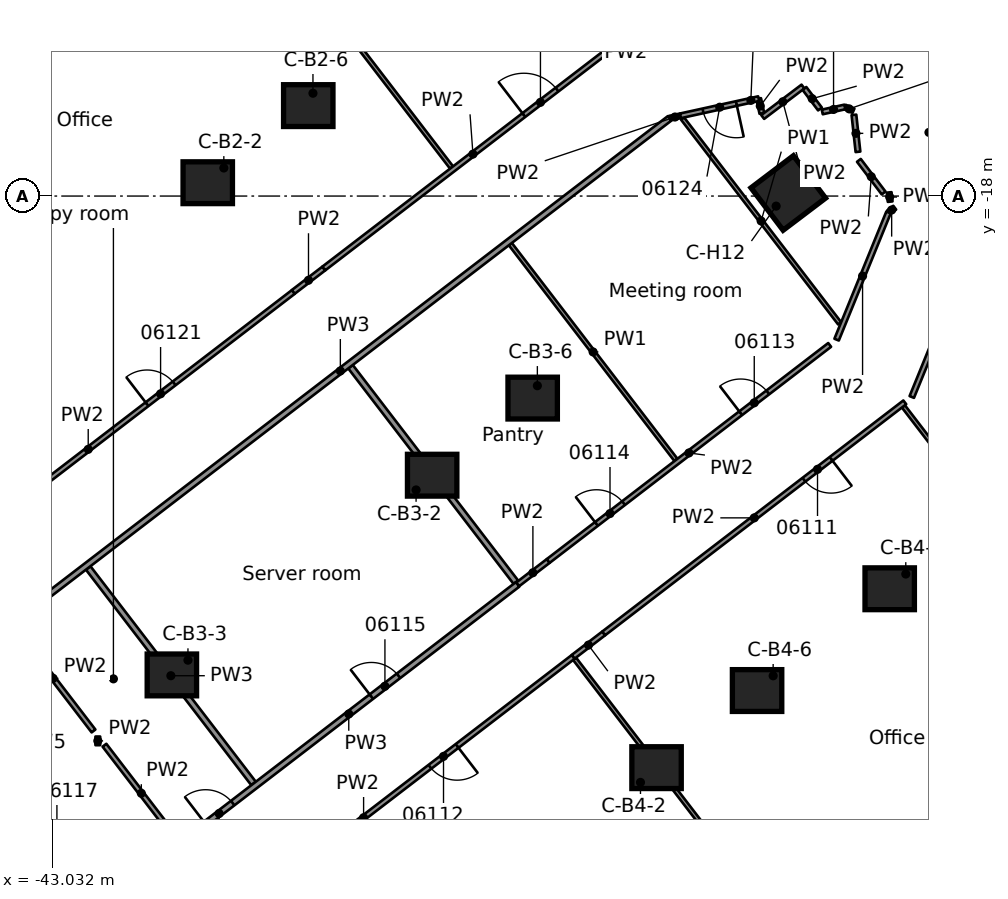
"""IFC4 building model, lengths in metres.
Left out: names, types, materials, properties, quantities, classifications, styles, units other than length and angle.
Written with IfcOpenShell. Run it as: python <this file> out.ifc"""

import sys

from ifc_helpers import new_model, si_unit, direction, frame, frame_2d, origin, origin_2d, place, context, subcontext, project, spatial, rectangle, extrude, element, fill, save


model = new_model("IFC4")
c1 = context("Model", 3, precision=1e-05, world=origin(), true_north=direction((0.0, 1.0)))
c2 = subcontext(c1, "Body", "Model", "MODEL_VIEW")
j1 = project(units=[si_unit("LENGTHUNIT", "METRE"), si_unit("PLANEANGLEUNIT", "RADIAN")], contexts=[c1])
p1 = place(None, origin())
s1 = spatial("IfcSite", under=j1, at=p1, CompositionType="ELEMENT")
p2 = place(p1, origin())
s2 = spatial("IfcBuilding", under=s1, at=p2, CompositionType="ELEMENT")
p3 = place(p2, frame((0.0, 0.0, 29.2)))
s3 = spatial("IfcBuildingStorey", under=s2, at=p3, CompositionType="ELEMENT", Elevation=29.2)
for number, where, z_axis, x_axis in (
    (1, (-38.935, -17.649, 0.0), (0.0, 0.0, 1.0), (1.0, 0.0, 0.0)),
    (2, (-36.29, -15.62, 0.0), (0.0, 0.0, 1.0), (1.0, 0.0, 0.0)),
    (3, (-33.03, -25.345, 0.0), (0.0, 0.0, 1.0), (1.0, 0.0, 0.0)),
    (4, (-39.879, -30.6, 0.0), (0.0, 0.0, 1.0), (1.0, 0.0, 0.0)),
    (5, (-30.385, -23.316, 0.0), (0.0, 0.0, 1.0), (1.0, 0.0, 0.0)),
    (6, (-27.125, -33.04, 0.0), (0.0, 0.0, 1.0), (1.0, 0.0, 0.0)),
    (7, (-24.48, -31.011, 0.0), (0.0, 0.0, 1.0), (1.0, 0.0, 0.0)),
    (8, (-20.99, -28.333, 0.0), (0.0, 0.0, 1.0), (1.0, 0.0, 0.0)),
):
    element("IfcColumn", number, at=place(p3, frame(where, z_axis=z_axis, x_axis=x_axis)), inside=s3, PredefinedType="COLUMN", context=c2, shape_type="SweptSolid", body=[
        extrude(rectangle(XDim=1.3, YDim=1.1, at=origin_2d()), origin(), (0.0, 0.0, 1.0), 4.1),
    ])
p4 = place(p3, frame((-23.659, -17.919, 0.0), z_axis=(0.0, 0.0, 1.0), x_axis=(-0.797162615875, -0.603764659327, 0.0)))
e9 = element("IfcColumn", 9, at=p4, inside=s3, PredefinedType="COLUMN", context=c2, shape_type="SweptSolid", body=[
    extrude(rectangle(XDim=1.4, YDim=1.4, at=origin_2d()), origin(), (0.0, 0.0, 1.0), 4.1),
])
p5 = place(p3, frame((-21.004, -17.904, 0.0), z_axis=(0.0, 0.0, 1.0), x_axis=(0.105933230141, -0.994373245191, 0.0)))
e10 = element("IfcWall", 10, at=p5, inside=s3, PredefinedType="PARTITIONING", context=c2, shape_type="SweptSolid", body=[
    extrude(rectangle(XDim=0.244, YDim=0.125, at=frame_2d((0.122, 0.0))), origin(), (0.0, 0.0, 1.0), 3.66),
])
p6 = place(p3, frame((-21.931, -15.864, 0.0), z_axis=(0.0, 0.0, 1.0), x_axis=(0.10837572028, -0.99411000561, 0.0)))
e11 = element("IfcWall", 11, at=p6, inside=s3, PredefinedType="PARTITIONING", context=c2, shape_type="SweptSolid", body=[
    extrude(rectangle(XDim=0.978, YDim=0.125, at=frame_2d((0.489, 0.0))), origin(), (0.0, 0.0, 1.0), 3.66),
])
p7 = place(p3, frame((-24.438, -15.437, 0.0), z_axis=(0.0, 0.0, 1.0), x_axis=(0.212096867325, -0.977248647413, 0.0)))
e12 = element("IfcWall", 12, at=p7, inside=s3, PredefinedType="PARTITIONING", context=c2, shape_type="SweptSolid", body=[
    extrude(rectangle(XDim=0.396, YDim=0.125, at=frame_2d((0.198, 0.0))), origin(), (0.0, 0.0, 1.0), 3.66),
])
p8 = place(p3, frame((-23.234, -15.168, 0.0), z_axis=(0.0, 0.0, 1.0), x_axis=(0.602990949897, -0.797748026849, 0.0)))
e13 = element("IfcWall", 13, at=p8, inside=s3, PredefinedType="PARTITIONING", context=c2, shape_type="SweptSolid", body=[
    extrude(rectangle(XDim=0.678, YDim=0.125, at=frame_2d((0.339, 0.0))), origin(), (0.0, 0.0, 1.0), 3.66),
])
p9 = place(p3, frame((-21.801, -17.061, 0.0), z_axis=(0.0, 0.0, 1.0), x_axis=(0.604123687543, -0.796890563471, 0.0)))
e14 = element("IfcWall", 14, at=p9, inside=s3, PredefinedType="PARTITIONING", context=c2, shape_type="SweptSolid", body=[
    extrude(rectangle(XDim=1.078, YDim=0.125, at=frame_2d((0.539, 0.0))), origin(), (0.0, 0.0, 1.0), 3.66),
])
p10 = place(p3, frame((-40.384, -38.535, 0.0), z_axis=(0.0, 0.0, 1.0), x_axis=(-0.609026744184, 0.793149686294, 0.0)))
e15 = element("IfcWall", 15, at=p10, inside=s3, PredefinedType="PARTITIONING", context=c2, shape_type="SweptSolid", body=[
    extrude(rectangle(XDim=11.975, YDim=0.125, at=frame_2d((5.987, 0.0))), origin(), (0.0, 0.0, 1.0), 3.049),
])
p11 = place(p10, frame((3.688, 0.0, 0.0)))
e16 = element("IfcOpeningElement", 16, at=p11, cuts=e15, PredefinedType="OPENING", context=c2, shape_type="SweptSolid", body=[
    extrude(rectangle(XDim=0.9, YDim=2.1, at=frame_2d((0.45, 1.05))), frame((0.0, 0.073, 0.0), z_axis=(0.0, -1.0, 0.0), x_axis=(1.0, 0.0, 0.0)), (0.0, 0.0, 1.0), 0.145),
])
p12 = place(p10, frame((7.338, 0.0, 0.0)))
e17 = element("IfcOpeningElement", 17, at=p12, cuts=e15, PredefinedType="OPENING", context=c2, shape_type="SweptSolid", body=[
    extrude(rectangle(XDim=0.9, YDim=2.1, at=frame_2d((0.45, 1.05))), frame((0.0, 0.073, 0.0), z_axis=(0.0, -1.0, 0.0), x_axis=(1.0, 0.0, 0.0)), (0.0, 0.0, 1.0), 0.145),
])
p13 = place(p3, frame((-44.064, -29.307, 0.0), z_axis=(0.0, 0.0, 1.0), x_axis=(0.608587271244, -0.793486945879, 0.0)))
e18 = element("IfcWall", 18, at=p13, inside=s3, PredefinedType="PARTITIONING", context=c2, shape_type="SweptSolid", body=[
    extrude(rectangle(XDim=3.489, YDim=0.125, at=frame_2d((1.744, 0.0))), origin(), (0.0, 0.0, 1.0), 3.66),
])
p14 = place(p3, frame((-41.653, -32.45, 0.0), z_axis=(0.0, 0.0, 1.0), x_axis=(0.60867753108, -0.793417710389, 0.0)))
e19 = element("IfcWall", 19, at=p14, inside=s3, PredefinedType="PARTITIONING", context=c2, shape_type="SweptSolid", body=[
    extrude(rectangle(XDim=3.188, YDim=0.125, at=frame_2d((1.594, 0.0))), origin(), (0.0, 0.0, 1.0), 3.66),
])
p15 = place(p3, frame((-42.081, -27.786, 0.0), z_axis=(0.0, 0.0, 1.0), x_axis=(0.608779288924, -0.793339635577, 0.0)))
e20 = element("IfcWall", 20, at=p15, inside=s3, PredefinedType="PARTITIONING", context=c2, shape_type="SweptSolid", body=[
    extrude(rectangle(XDim=7.147, YDim=0.15, at=frame_2d((3.574, 0.0))), origin(), (0.0, 0.0, 1.0), 3.66),
])
p16 = place(p3, frame((-35.179, -22.489, 0.0), z_axis=(0.0, 0.0, 1.0), x_axis=(0.608729798771, -0.793377610024, 0.0)))
e21 = element("IfcWall", 21, at=p16, inside=s3, PredefinedType="PARTITIONING", context=c2, shape_type="SweptSolid", body=[
    extrude(rectangle(XDim=7.148, YDim=0.15, at=frame_2d((3.574, 0.0))), origin(), (0.0, 0.0, 1.0), 3.66),
])
p17 = place(p3, frame((-29.282, -30.176, 0.0), z_axis=(0.0, 0.0, 1.0), x_axis=(0.608773787241, -0.793343857333, 0.0)))
e22 = element("IfcWall", 22, at=p17, inside=s3, PredefinedType="PARTITIONING", context=c2, shape_type="SweptSolid", body=[
    extrude(rectangle(XDim=14.135, YDim=0.1, at=frame_2d((7.067, 0.0))), origin(), (0.0, 0.0, 1.0), 3.025),
])
p18 = place(p3, frame((-41.126, -6.033, 0.0), z_axis=(0.0, 0.0, 1.0), x_axis=(0.608775561638, -0.793342495743, 0.0)))
e23 = element("IfcWall", 23, at=p18, inside=s3, PredefinedType="PARTITIONING", context=c2, shape_type="SweptSolid", body=[
    extrude(rectangle(XDim=14.136, YDim=0.1, at=frame_2d((7.068, 0.0))), origin(), (0.0, 0.0, 1.0), 3.66),
])
p19 = place(p3, frame((-30.975, -19.261, 0.0), z_axis=(0.0, 0.0, 1.0), x_axis=(0.60876639971, -0.793349526113, 0.0)))
e24 = element("IfcWall", 24, at=p19, inside=s3, PredefinedType="PARTITIONING", context=c2, shape_type="SweptSolid", body=[
    extrude(rectangle(XDim=7.162, YDim=0.1, at=frame_2d((3.581, 0.0))), origin(), (0.0, 0.0, 1.0), 3.66),
])
p20 = place(p3, frame((-26.44, -15.962, 0.0), z_axis=(0.0, 0.0, 1.0), x_axis=(0.608697215762, -0.79340260872, 0.0)))
e25 = element("IfcWall", 25, at=p20, inside=s3, PredefinedType="PARTITIONING", context=c2, shape_type="SweptSolid", body=[
    extrude(rectangle(XDim=6.79, YDim=0.1, at=frame_2d((3.395, 0.0))), origin(), (0.0, 0.0, 1.0), 3.66),
])
p21 = place(p3, frame((-20.629, -23.535, 0.0), z_axis=(0.0, 0.0, 1.0), x_axis=(0.608775561638, -0.793342495743, 0.0)))
e26 = element("IfcWall", 26, at=p21, inside=s3, PredefinedType="PARTITIONING", context=c2, shape_type="SweptSolid", body=[
    extrude(rectangle(XDim=14.136, YDim=0.1, at=frame_2d((7.068, 0.0))), origin(), (0.0, 0.0, 1.0), 3.66),
])
p22 = place(p3, frame((-22.17, -15.656, 0.0), z_axis=(0.0, 0.0, 1.0), x_axis=(0.914864311429, -0.403761429156, 0.0)))
e27 = element("IfcWall", 27, at=p22, inside=s3, PredefinedType="PARTITIONING", context=c2, shape_type="SweptSolid", body=[
    extrude(rectangle(XDim=0.248, YDim=0.125, at=frame_2d((0.124, 0.0))), origin(), (0.0, 0.0, 1.0), 3.66),
])
p23 = place(p3, frame((-26.785, -15.952, 0.0), z_axis=(0.0, 0.0, 1.0), x_axis=(0.977034522057, 0.213081070744, 0.0)))
e28 = element("IfcWall", 28, at=p23, inside=s3, PredefinedType="PARTITIONING", context=c2, shape_type="SweptSolid", body=[
    extrude(rectangle(XDim=0.296, YDim=0.125, at=frame_2d((0.148, 0.0))), origin(), (0.0, 0.0, 1.0), 3.66),
])
p24 = place(p3, frame((-22.765, -15.787, 0.0), z_axis=(0.0, 0.0, 1.0), x_axis=(0.97657209397, 0.215190486033, 0.0)))
e29 = element("IfcWall", 29, at=p24, inside=s3, PredefinedType="PARTITIONING", context=c2, shape_type="SweptSolid", body=[
    extrude(rectangle(XDim=0.609, YDim=0.125, at=frame_2d((0.305, 0.0))), origin(), (0.0, 0.0, 1.0), 3.66),
])
p25 = place(p3, frame((-24.438, -15.437, 0.0), z_axis=(0.0, 0.0, 1.0), x_axis=(-0.976731913461, -0.214463911247, 0.0)))
e30 = element("IfcWall", 30, at=p25, inside=s3, PredefinedType="PARTITIONING", context=c2, shape_type="SweptSolid", body=[
    extrude(rectangle(XDim=2.107, YDim=0.125, at=frame_2d((1.054, 0.0))), origin(), (0.0, 0.0, 1.0), 3.66),
])
p26 = place(p25, frame((0.6, 0.0, 0.0)))
e31 = element("IfcOpeningElement", 31, at=p26, cuts=e30, PredefinedType="OPENING", context=c2, shape_type="SweptSolid", body=[
    extrude(rectangle(XDim=0.9, YDim=2.1, at=frame_2d((0.45, 1.05))), frame((0.0, 0.073, 0.0), z_axis=(0.0, -1.0, 0.0), x_axis=(1.0, 0.0, 0.0)), (0.0, 0.0, 1.0), 0.145),
])
p27 = place(p3, frame((-24.332, -15.92, 0.0), z_axis=(0.0, 0.0, 1.0), x_axis=(0.797480426333, 0.603344818172, 0.0)))
e32 = element("IfcWall", 32, at=p27, inside=s3, PredefinedType="PARTITIONING", context=c2, shape_type="SweptSolid", body=[
    extrude(rectangle(XDim=1.329, YDim=0.125, at=frame_2d((0.665, 0.0))), origin(), (0.0, 0.0, 1.0), 3.66),
])
p28 = place(p3, frame((-21.019, -18.428, 0.0), z_axis=(0.0, 0.0, 1.0), x_axis=(0.797092148154, 0.603857687995, 0.0)))
e33 = element("IfcWall", 33, at=p28, inside=s3, PredefinedType="PARTITIONING", context=c2, shape_type="SweptSolid", body=[
    extrude(rectangle(XDim=0.202, YDim=0.125, at=frame_2d((0.101, 0.0))), origin(), (0.0, 0.0, 1.0), 3.66),
])
p29 = place(p3, frame((-29.32, -30.124, 0.0), z_axis=(0.0, 0.0, 1.0), x_axis=(0.793776779764, 0.608209194198, 0.0)))
e34 = element("IfcWall", 34, at=p29, inside=s3, PredefinedType="PARTITIONING", context=c2, shape_type="SweptSolid", body=[
    extrude(rectangle(XDim=1.014, YDim=0.125, at=frame_2d((0.507, 0.0))), origin(), (0.0, 0.0, 1.0), 3.66),
])
p30 = place(p3, frame((-29.32, -30.127, 0.0), z_axis=(0.0, 0.0, 1.0), x_axis=(-0.793456491448, -0.608626976217, 0.0)))
e35 = element("IfcWall", 35, at=p30, inside=s3, PredefinedType="PARTITIONING", context=c2, shape_type="SweptSolid", body=[
    extrude(rectangle(XDim=13.898, YDim=0.125, at=frame_2d((6.949, 0.0))), origin(), (0.0, 0.0, 1.0), 3.66),
])
p31 = place(p30, frame((3.849, 0.0, 0.0)))
e36 = element("IfcOpeningElement", 36, at=p31, cuts=e35, PredefinedType="OPENING", context=c2, shape_type="SweptSolid", body=[
    extrude(rectangle(XDim=0.9, YDim=2.1, at=frame_2d((0.45, 1.05))), frame((0.0, 0.073, 0.0), z_axis=(0.0, -1.0, 0.0), x_axis=(1.0, 0.0, 0.0)), (0.0, 0.0, 1.0), 0.145),
])
p32 = place(p3, frame((-20.593, -23.428, 0.0), z_axis=(0.0, 0.0, 1.0), x_axis=(-0.793332393454, -0.608788726486, 0.0)))
e37 = element("IfcWall", 37, at=p32, inside=s3, PredefinedType="PARTITIONING", context=c2, shape_type="SweptSolid", body=[
    extrude(rectangle(XDim=9.986, YDim=0.125, at=frame_2d((4.993, 0.0))), origin(), (0.0, 0.0, 1.0), 3.66),
])
p33 = place(p32, frame((2.445, 0.0, 0.0)))
e38 = element("IfcOpeningElement", 38, at=p33, cuts=e37, PredefinedType="OPENING", context=c2, shape_type="SweptSolid", body=[
    extrude(rectangle(XDim=0.9, YDim=2.1, at=frame_2d((0.45, 1.05))), frame((0.0, 0.073, 0.0), z_axis=(0.0, -1.0, 0.0), x_axis=(1.0, 0.0, 0.0)), (0.0, 0.0, 1.0), 0.145),
])
p34 = place(p3, frame((-30.782, -28.22, 0.0), z_axis=(0.0, 0.0, 1.0), x_axis=(0.793579274907, 0.608466872096, 0.0)))
e39 = element("IfcWall", 39, at=p34, inside=s3, PredefinedType="PARTITIONING", context=c2, shape_type="SweptSolid", body=[
    extrude(rectangle(XDim=1.016, YDim=0.125, at=frame_2d((0.508, 0.0))), origin(), (0.0, 0.0, 1.0), 3.66),
])
p35 = place(p3, frame((-39.667, -35.038, 0.0), z_axis=(0.0, 0.0, 1.0), x_axis=(0.793293656215, 0.608839202917, 0.0)))
e40 = element("IfcWall", 40, at=p35, inside=s3, PredefinedType="PARTITIONING", context=c2, shape_type="SweptSolid", body=[
    extrude(rectangle(XDim=11.2, YDim=0.15, at=frame_2d((5.6, 0.0))), origin(), (0.0, 0.0, 1.0), 3.66),
])
p36 = place(p35, frame((6.35, 0.0, 0.0)))
e41 = element("IfcOpeningElement", 41, at=p36, cuts=e40, PredefinedType="OPENING", context=c2, shape_type="SweptSolid", body=[
    extrude(rectangle(XDim=0.9, YDim=2.1, at=frame_2d((0.45, 1.05))), frame((0.0, 0.085, 0.0), z_axis=(0.0, -1.0, 0.0), x_axis=(1.0, 0.0, 0.0)), (0.0, 0.0, 1.0), 0.17),
])
p37 = place(p35, frame((0.85, 0.0, 0.0)))
e42 = element("IfcOpeningElement", 42, at=p37, cuts=e40, PredefinedType="OPENING", context=c2, shape_type="SweptSolid", body=[
    extrude(rectangle(XDim=0.9, YDim=2.1, at=frame_2d((0.45, 1.05))), frame((0.0, 0.085, 0.0), z_axis=(0.0, -1.0, 0.0), x_axis=(1.0, 0.0, 0.0)), (0.0, 0.0, 1.0), 0.17),
])
p38 = place(p3, frame((-29.976, -27.602, 0.0), z_axis=(0.0, 0.0, 1.0), x_axis=(0.793237948633, 0.608911780843, 0.0)))
e43 = element("IfcWall", 43, at=p38, inside=s3, PredefinedType="PARTITIONING", context=c2, shape_type="SweptSolid", body=[
    extrude(rectangle(XDim=9.336, YDim=0.125, at=frame_2d((4.668, 0.0))), origin(), (0.0, 0.0, 1.0), 3.66),
])
p39 = place(p38, frame((6.385, 0.0, 0.0)))
e44 = element("IfcOpeningElement", 44, at=p39, cuts=e43, PredefinedType="OPENING", context=c2, shape_type="SweptSolid", body=[
    extrude(rectangle(XDim=0.9, YDim=2.1, at=frame_2d((0.45, 1.05))), frame((0.0, 0.073, 0.0), z_axis=(0.0, -1.0, 0.0), x_axis=(1.0, 0.0, 0.0)), (0.0, 0.0, 1.0), 0.145),
])
p40 = place(p38, frame((1.6, 0.0, 0.0)))
e45 = element("IfcOpeningElement", 45, at=p40, cuts=e43, PredefinedType="OPENING", context=c2, shape_type="SweptSolid", body=[
    extrude(rectangle(XDim=0.9, YDim=2.1, at=frame_2d((0.45, 1.05))), frame((0.0, 0.073, 0.0), z_axis=(0.0, -1.0, 0.0), x_axis=(1.0, 0.0, 0.0)), (0.0, 0.0, 1.0), 0.145),
])
p41 = place(p3, frame((-44.11, -29.247, 0.0), z_axis=(0.0, 0.0, 1.0), x_axis=(0.793471030698, 0.608608021179, 0.0)))
e46 = element("IfcWall", 46, at=p41, inside=s3, PredefinedType="PARTITIONING", context=c2, shape_type="SweptSolid", body=[
    extrude(rectangle(XDim=21.838, YDim=0.15, at=frame_2d((10.919, 0.0))), origin(), (0.0, 0.0, 1.0), 3.66),
])
p42 = place(p3, frame((-36.687, -20.524, 0.0), z_axis=(0.0, 0.0, 1.0), x_axis=(0.793579274907, 0.608466872096, 0.0)))
e47 = element("IfcWall", 47, at=p42, inside=s3, PredefinedType="PARTITIONING", context=c2, shape_type="SweptSolid", body=[
    extrude(rectangle(XDim=1.016, YDim=0.125, at=frame_2d((0.508, 0.0))), origin(), (0.0, 0.0, 1.0), 3.66),
])
p43 = place(p3, frame((-47.476, -28.803, 0.0), z_axis=(0.0, 0.0, 1.0), x_axis=(0.793430085013, 0.608661400284, 0.0)))
e48 = element("IfcWall", 48, at=p43, inside=s3, PredefinedType="PARTITIONING", context=c2, shape_type="SweptSolid", body=[
    extrude(rectangle(XDim=13.6, YDim=0.125, at=frame_2d((6.8, 0.0))), origin(), (0.0, 0.0, 1.0), 3.66),
])
p44 = place(p43, frame((2.326, 0.0, 0.0)))
e49 = element("IfcOpeningElement", 49, at=p44, cuts=e48, PredefinedType="OPENING", context=c2, shape_type="SweptSolid", body=[
    extrude(rectangle(XDim=0.9, YDim=2.1, at=frame_2d((0.45, 1.05))), frame((0.0, 0.073, 0.0), z_axis=(0.0, -1.0, 0.0), x_axis=(1.0, 0.0, 0.0)), (0.0, 0.0, 1.0), 0.145),
])
p45 = place(p43, frame((8.75, 0.0, 0.0)))
e50 = element("IfcOpeningElement", 50, at=p45, cuts=e48, PredefinedType="OPENING", context=c2, shape_type="SweptSolid", body=[
    extrude(rectangle(XDim=0.9, YDim=2.1, at=frame_2d((0.45, 1.05))), frame((0.0, 0.073, 0.0), z_axis=(0.0, -1.0, 0.0), x_axis=(1.0, 0.0, 0.0)), (0.0, 0.0, 1.0), 0.145),
])
p46 = place(p3, frame((-35.881, -19.906, 0.0), z_axis=(0.0, 0.0, 1.0), x_axis=(0.793491146474, 0.608581794394, 0.0)))
e51 = element("IfcWall", 51, at=p46, inside=s3, PredefinedType="PARTITIONING", context=c2, shape_type="SweptSolid", body=[
    extrude(rectangle(XDim=9.892, YDim=0.125, at=frame_2d((4.946, 0.0))), origin(), (0.0, 0.0, 1.0), 3.66),
])
p47 = place(p46, frame((6.634, 0.0, 0.0)))
e52 = element("IfcOpeningElement", 52, at=p47, cuts=e51, PredefinedType="OPENING", context=c2, shape_type="SweptSolid", body=[
    extrude(rectangle(XDim=1.1, YDim=2.1, at=frame_2d((0.55, 1.05))), frame((0.0, 0.073, 0.0), z_axis=(0.0, -1.0, 0.0), x_axis=(1.0, 0.0, 0.0)), (0.0, 0.0, 1.0), 0.145),
])
p48 = place(p3, frame((-18.51, -18.634, 0.0), z_axis=(0.0, 0.0, 1.0), x_axis=(-0.377847706778, -0.925867760797, 0.0)))
e53 = element("IfcWall", 53, at=p48, inside=s3, PredefinedType="PARTITIONING", context=c2, shape_type="SweptSolid", body=[
    extrude(rectangle(XDim=5.026, YDim=0.125, at=frame_2d((2.513, 0.0))), origin(), (0.0, 0.0, 1.0), 3.66),
])
p49 = place(p48, frame((2.1, 0.0, 0.0)))
e54 = element("IfcOpeningElement", 54, at=p49, cuts=e53, PredefinedType="OPENING", context=c2, shape_type="SweptSolid", body=[
    extrude(rectangle(XDim=0.9, YDim=2.1, at=frame_2d((0.45, 1.05))), frame((0.0, 0.073, 0.0), z_axis=(0.0, -1.0, 0.0), x_axis=(1.0, 0.0, 0.0)), (0.0, 0.0, 1.0), 0.145),
])
p50 = place(p3, frame((-22.387, -21.778, 0.0), z_axis=(0.0, 0.0, 1.0), x_axis=(0.377843834017, 0.925869341265, 0.0)))
e55 = element("IfcWall", 55, at=p50, inside=s3, PredefinedType="PARTITIONING", context=c2, shape_type="SweptSolid", body=[
    extrude(rectangle(XDim=3.615, YDim=0.125, at=frame_2d((1.808, 0.0))), origin(), (0.0, 0.0, 1.0), 3.66),
])
p51 = place(p3, frame((-41.828, -32.449, 0.0), z_axis=(0.0, 0.0, 1.0), x_axis=(0.0, 1.0, 0.0)))
e56 = element("IfcWall", 56, at=p51, inside=s3, PredefinedType="PARTITIONING", context=c2, shape_type="SweptSolid", body=[
    extrude(rectangle(XDim=0.228, YDim=0.125, at=frame_2d((0.114, 0.0))), origin(), (0.0, 0.0, 1.0), 3.66),
])
p52 = place(p33, origin())
e57 = element("IfcDoor", 57, at=p52, inside=s3, OperationType="SINGLE_SWING_LEFT", PredefinedType="DOOR", context=c2, shape_type="SweptSolid", body=[
    extrude(rectangle(XDim=0.9, YDim=2.1, at=frame_2d((0.45, 1.05))), frame((0.0, 0.025, 0.0), z_axis=(0.0, -1.0, 0.0), x_axis=(1.0, 0.0, 0.0)), (0.0, 0.0, 1.0), 0.05),
])
fill(e38, e57)
p53 = place(p31, origin())
e58 = element("IfcDoor", 58, at=p53, inside=s3, OperationType="SINGLE_SWING_LEFT", PredefinedType="DOOR", context=c2, shape_type="SweptSolid", body=[
    extrude(rectangle(XDim=0.9, YDim=2.1, at=frame_2d((0.45, 1.05))), frame((0.0, 0.025, 0.0), z_axis=(0.0, -1.0, 0.0), x_axis=(1.0, 0.0, 0.0)), (0.0, 0.0, 1.0), 0.05),
])
fill(e36, e58)
p54 = place(p39, origin())
e59 = element("IfcDoor", 59, at=p54, inside=s3, OperationType="SINGLE_SWING_RIGHT", PredefinedType="DOOR", context=c2, shape_type="SweptSolid", body=[
    extrude(rectangle(XDim=0.9, YDim=2.1, at=frame_2d((0.45, 1.05))), frame((0.0, 0.025, 0.0), z_axis=(0.0, -1.0, 0.0), x_axis=(1.0, 0.0, 0.0)), (0.0, 0.0, 1.0), 0.05),
])
fill(e44, e59)
p55 = place(p40, origin())
e60 = element("IfcDoor", 60, at=p55, inside=s3, OperationType="SINGLE_SWING_LEFT", PredefinedType="DOOR", context=c2, shape_type="SweptSolid", body=[
    extrude(rectangle(XDim=0.9, YDim=2.1, at=frame_2d((0.45, 1.05))), frame((0.0, 0.025, 0.0), z_axis=(0.0, -1.0, 0.0), x_axis=(1.0, 0.0, 0.0)), (0.0, 0.0, 1.0), 0.05),
])
fill(e45, e60)
p56 = place(p36, origin())
e61 = element("IfcDoor", 61, at=p56, inside=s3, OperationType="SINGLE_SWING_RIGHT", PredefinedType="DOOR", context=c2, shape_type="SweptSolid", body=[
    extrude(rectangle(XDim=0.9, YDim=2.1, at=frame_2d((0.45, 1.05))), frame((0.0, 0.025, 0.0), z_axis=(0.0, -1.0, 0.0), x_axis=(1.0, 0.0, 0.0)), (0.0, 0.0, 1.0), 0.05),
])
fill(e41, e61)
p57 = place(p37, origin())
e62 = element("IfcDoor", 62, at=p57, inside=s3, OperationType="SINGLE_SWING_LEFT", PredefinedType="DOOR", context=c2, shape_type="SweptSolid", body=[
    extrude(rectangle(XDim=0.9, YDim=2.1, at=frame_2d((0.45, 1.05))), frame((0.0, 0.025, 0.0), z_axis=(0.0, -1.0, 0.0), x_axis=(1.0, 0.0, 0.0)), (0.0, 0.0, 1.0), 0.05),
])
fill(e42, e62)
p58 = place(p47, origin())
e63 = element("IfcDoor", 63, at=p58, inside=s3, OperationType="SINGLE_SWING_RIGHT", PredefinedType="DOOR", context=c2, shape_type="SweptSolid", body=[
    extrude(rectangle(XDim=1.1, YDim=2.1, at=frame_2d((0.55, 1.05))), frame((0.0, 0.025, 0.0), z_axis=(0.0, -1.0, 0.0), x_axis=(1.0, 0.0, 0.0)), (0.0, 0.0, 1.0), 0.05),
])
fill(e52, e63)
p59 = place(p45, origin())
e64 = element("IfcDoor", 64, at=p59, inside=s3, OperationType="SINGLE_SWING_RIGHT", PredefinedType="DOOR", context=c2, shape_type="SweptSolid", body=[
    extrude(rectangle(XDim=0.9, YDim=2.1, at=frame_2d((0.45, 1.05))), frame((0.0, 0.025, 0.0), z_axis=(0.0, -1.0, 0.0), x_axis=(1.0, 0.0, 0.0)), (0.0, 0.0, 1.0), 0.05),
])
fill(e50, e64)
p60 = place(p26, origin())
e65 = element("IfcDoor", 65, at=p60, inside=s3, OperationType="SINGLE_SWING_LEFT", PredefinedType="DOOR", context=c2, shape_type="SweptSolid", body=[
    extrude(rectangle(XDim=0.9, YDim=2.1, at=frame_2d((0.45, 1.05))), frame((0.0, 0.025, 0.0), z_axis=(0.0, -1.0, 0.0), x_axis=(1.0, 0.0, 0.0)), (0.0, 0.0, 1.0), 0.05),
])
fill(e31, e65)
save(model, sys.argv[1])
